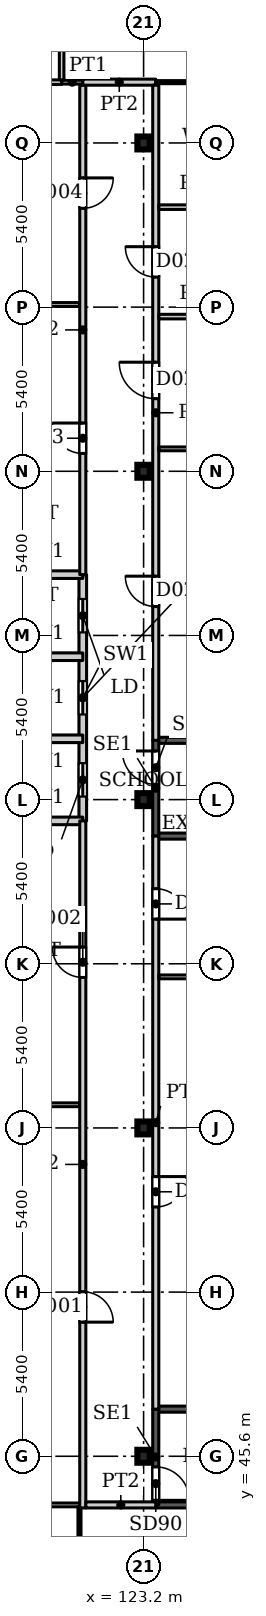
"""IFC4 building model, lengths in metres.
Left out: names, types, materials, properties, quantities, classifications, styles, units other than length and angle.
Written with IfcOpenShell. Run it as: python <this file> out.ifc"""

import sys

from ifc_helpers import new_model, si_unit, direction, frame, frame_2d, origin, origin_2d, place, context, subcontext, project, spatial, rectangle, i_section, extrude, source, transform, mapped, element, fill, save


model = new_model("IFC4")
c1 = context("Model", 3, precision=1e-05, world=origin(), true_north=direction((0.0, 1.0)))
c2 = subcontext(c1, "Body", "Model", "MODEL_VIEW")
j1 = project(units=[si_unit("LENGTHUNIT", "METRE"), si_unit("PLANEANGLEUNIT", "RADIAN")], contexts=[c1])
p1 = place(None, origin())
s1 = spatial("IfcSite", under=j1, at=p1, CompositionType="ELEMENT")
p2 = place(p1, origin())
s2 = spatial("IfcBuilding", under=s1, at=p2, CompositionType="ELEMENT")
p3 = place(p2, frame((0.0, 0.0, 12.5)))
s3 = spatial("IfcBuildingStorey", under=s2, at=p3, CompositionType="ELEMENT", Elevation=12.5)
for number, where, z_axis, x_axis in (
    (1, (123.2, 45.6, 0.0), (0.0, 0.0, 1.0), (1.0, 0.0, 0.0)),
    (2, (123.2, 56.4, 0.0), (0.0, 0.0, 1.0), (1.0, 0.0, 0.0)),
    (3, (123.2, 67.2, 0.0), (0.0, 0.0, 1.0), (1.0, 0.0, 0.0)),
    (4, (123.2, 78.0, 0.0), (0.0, 0.0, 1.0), (1.0, 0.0, 0.0)),
    (5, (123.2, 88.8, 0.0), (0.0, 0.0, 1.0), (1.0, 0.0, 0.0)),
):
    element("IfcColumn", number, at=place(p3, frame(where, z_axis=z_axis, x_axis=x_axis)), inside=s3, PredefinedType="COLUMN", context=c2, shape_type="SweptSolid", body=[
        extrude(i_section(OverallWidth=0.409, OverallDepth=0.425, WebThickness=0.033, FlangeThickness=0.052, FilletRadius=0.013, at=origin_2d()), origin(), (0.0, 0.0, 1.0), 4.5),
    ])
p4 = place(p3, frame((121.2, 66.5, 0.0), z_axis=(0.0, 0.0, 1.0), x_axis=(0.0, 1.0, 0.0)))
e6 = element("IfcWall", 6, at=p4, inside=s3, PredefinedType="PARTITIONING", context=c2, shape_type="SweptSolid", body=[
    extrude(rectangle(XDim=8.1, YDim=0.25, at=frame_2d((4.05, 0.0))), origin(), (0.0, 0.0, 1.0), 4.5),
])
p5 = place(p4, frame((0.8, 0.0, 0.0)))
e7 = element("IfcOpeningElement", 7, at=p5, cuts=e6, PredefinedType="OPENING", context=c2, shape_type="SweptSolid", body=[
    extrude(rectangle(XDim=1.1, YDim=2.2, at=frame_2d((0.55, 1.1))), frame((0.0, 0.135, 0.0), z_axis=(0.0, -1.0, 0.0), x_axis=(1.0, 0.0, 0.0)), (0.0, 0.0, 1.0), 0.27),
])
p6 = place(p4, frame((3.5, 0.0, 0.0)))
e8 = element("IfcOpeningElement", 8, at=p6, cuts=e6, PredefinedType="OPENING", context=c2, shape_type="SweptSolid", body=[
    extrude(rectangle(XDim=1.1, YDim=2.2, at=frame_2d((0.55, 1.1))), frame((0.0, 0.135, 0.0), z_axis=(0.0, -1.0, 0.0), x_axis=(1.0, 0.0, 0.0)), (0.0, 0.0, 1.0), 0.27),
])
p7 = place(p4, frame((6.2, 0.0, 0.0)))
e9 = element("IfcOpeningElement", 9, at=p7, cuts=e6, PredefinedType="OPENING", context=c2, shape_type="SweptSolid", body=[
    extrude(rectangle(XDim=1.1, YDim=2.2, at=frame_2d((0.55, 1.1))), frame((0.0, 0.135, 0.0), z_axis=(0.0, -1.0, 0.0), x_axis=(1.0, 0.0, 0.0)), (0.0, 0.0, 1.0), 0.27),
])
for number, where, z_axis, x_axis in (
    (10, (118.5, 66.5, 0.0), (0.0, 0.0, 1.0), (1.0, 0.0, 0.0)),
    (11, (118.5, 69.2, 0.0), (0.0, 0.0, 1.0), (1.0, 0.0, 0.0)),
    (12, (118.5, 71.9, 0.0), (0.0, 0.0, 1.0), (1.0, 0.0, 0.0)),
    (13, (118.5, 74.6, 0.0), (0.0, 0.0, 1.0), (1.0, 0.0, 0.0)),
):
    element("IfcWall", number, at=place(p3, frame(where, z_axis=z_axis, x_axis=x_axis)), inside=s3, PredefinedType="PARTITIONING", context=c2, shape_type="SweptSolid", body=[
        extrude(rectangle(XDim=2.7, YDim=0.25, at=frame_2d((1.35, 0.0))), origin(), (0.0, 0.0, 1.0), 4.5),
    ])
p8 = place(p3, frame((123.6, 44.0, 0.0), z_axis=(0.0, 0.0, 1.0), x_axis=(1.0, 0.0, 0.0)))
e14 = element("IfcWall", 14, at=p8, inside=s3, PredefinedType="SHEAR", context=c2, shape_type="SweptSolid", body=[
    extrude(rectangle(XDim=7.2, YDim=0.2, at=frame_2d((3.6, 0.0))), origin(), (0.0, 0.0, 1.0), 4.5),
])
p9 = place(p3, frame((123.6, 47.15, 0.0), z_axis=(0.0, 0.0, 1.0), x_axis=(1.0, 0.0, 0.0)))
e15 = element("IfcWall", 15, at=p9, inside=s3, PredefinedType="SHEAR", context=c2, shape_type="SweptSolid", body=[
    extrude(rectangle(XDim=8.4, YDim=0.2, at=frame_2d((4.2, 0.0))), origin(), (0.0, 0.0, 1.0), 4.5),
])
p10 = place(p3, frame((123.6, 44.0, 0.0), z_axis=(0.0, 0.0, 1.0), x_axis=(0.0, 1.0, 0.0)))
e16 = element("IfcWall", 16, at=p10, inside=s3, PredefinedType="SHEAR", context=c2, shape_type="SweptSolid", body=[
    extrude(rectangle(XDim=3.15, YDim=0.2, at=frame_2d((1.575, 0.0))), origin(), (0.0, 0.0, 1.0), 4.5),
])
p11 = place(p10, frame((0.15, 0.0, 0.0)))
e17 = element("IfcOpeningElement", 17, at=p11, cuts=e16, PredefinedType="OPENING", context=c2, shape_type="SweptSolid", body=[
    extrude(rectangle(XDim=1.1, YDim=2.2, at=frame_2d((0.55, 1.1))), frame((0.0, 0.11, 0.0), z_axis=(0.0, -1.0, 0.0), x_axis=(1.0, 0.0, 0.0)), (0.0, 0.0, 1.0), 0.22),
])
p12 = place(p3, frame((123.6, 66.0, 0.0), z_axis=(0.0, 0.0, 1.0), x_axis=(1.0, 0.0, 0.0)))
e18 = element("IfcWall", 18, at=p12, inside=s3, PredefinedType="SHEAR", context=c2, shape_type="SweptSolid", body=[
    extrude(rectangle(XDim=7.2, YDim=0.2, at=frame_2d((3.6, 0.0))), origin(), (0.0, 0.0, 1.0), 4.5),
])
p13 = place(p3, frame((123.6, 69.15, 0.0), z_axis=(0.0, 0.0, 1.0), x_axis=(1.0, 0.0, 0.0)))
e19 = element("IfcWall", 19, at=p13, inside=s3, PredefinedType="SHEAR", context=c2, shape_type="SweptSolid", body=[
    extrude(rectangle(XDim=8.4, YDim=0.2, at=frame_2d((4.2, 0.0))), origin(), (0.0, 0.0, 1.0), 4.5),
])
p14 = place(p3, frame((123.6, 66.0, 0.0), z_axis=(0.0, 0.0, 1.0), x_axis=(0.0, 1.0, 0.0)))
e20 = element("IfcWall", 20, at=p14, inside=s3, PredefinedType="SHEAR", context=c2, shape_type="SweptSolid", body=[
    extrude(rectangle(XDim=3.15, YDim=0.2, at=frame_2d((1.575, 0.0))), origin(), (0.0, 0.0, 1.0), 4.5),
])
p15 = place(p14, frame((1.7, 0.0, 0.0)))
e21 = element("IfcOpeningElement", 21, at=p15, cuts=e20, PredefinedType="OPENING", context=c2, shape_type="SweptSolid", body=[
    extrude(rectangle(XDim=1.1, YDim=2.2, at=frame_2d((0.55, 1.1))), frame((0.0, 0.11, 0.0), z_axis=(0.0, -1.0, 0.0), x_axis=(1.0, 0.0, 0.0)), (0.0, 0.0, 1.0), 0.22),
])
p16 = place(p3, frame((110.183, 90.8, 0.0), z_axis=(0.0, 0.0, 1.0), x_axis=(1.0, 0.0, 0.0)))
e22 = element("IfcWall", 22, at=p16, inside=s3, PredefinedType="PARTITIONING", context=c2, shape_type="SweptSolid", body=[
    extrude(rectangle(XDim=10.321, YDim=0.15, at=frame_2d((5.16, 0.0))), origin(), (0.0, 0.0, 1.0), 4.18),
])
p17 = place(p3, frame((112.862, 44.0, 0.0), z_axis=(0.0, 0.0, 1.0), x_axis=(1.0, 0.0, 0.0)))
e23 = element("IfcWall", 23, at=p17, inside=s3, PredefinedType="PARTITIONING", context=c2, shape_type="SweptSolid", body=[
    extrude(rectangle(XDim=8.279, YDim=0.125, at=frame_2d((4.14, 0.0))), origin(), (0.0, 0.0, 1.0), 4.18),
])
for number, where, z_axis, x_axis in (
    (24, (112.862, 57.162, 0.0), (0.0, 0.0, 1.0), (1.0, 0.0, 0.0)),
    (25, (112.862, 83.487, 0.0), (0.0, 0.0, 1.0), (1.0, 0.0, 0.0)),
):
    element("IfcWall", number, at=place(p3, frame(where, z_axis=z_axis, x_axis=x_axis)), inside=s3, PredefinedType="PARTITIONING", context=c2, shape_type="SweptSolid", body=[
        extrude(rectangle(XDim=8.238, YDim=0.125, at=frame_2d((4.119, 0.0))), origin(), (0.0, 0.0, 1.0), 4.18),
    ])
p18 = place(p3, frame((120.504, 90.8, 0.0), z_axis=(0.0, 0.0, 1.0), x_axis=(1.0, 0.0, 0.0)))
e26 = element("IfcWall", 26, at=p18, inside=s3, PredefinedType="PARTITIONING", context=c2, shape_type="SweptSolid", body=[
    extrude(rectangle(XDim=0.696, YDim=0.125, at=frame_2d((0.348, 0.0))), origin(), (0.0, 0.0, 1.0), 4.18),
])
p19 = place(p3, frame((120.504, 90.875, 0.0), z_axis=(0.0, 0.0, 1.0), x_axis=(0.0, 1.0, 0.0)))
e27 = element("IfcWall", 27, at=p19, inside=s3, PredefinedType="PARTITIONING", context=c2, shape_type="SweptSolid", body=[
    extrude(rectangle(XDim=8.225, YDim=0.15, at=frame_2d((4.113, 0.0))), origin(), (0.0, 0.0, 1.0), 4.18),
])
p20 = place(p3, frame((121.091, 35.3, 0.0), z_axis=(0.0, 0.0, 1.0), x_axis=(0.0, 1.0, 0.0)))
e28 = element("IfcWall", 28, at=p20, inside=s3, PredefinedType="PARTITIONING", context=c2, shape_type="SweptSolid", body=[
    extrude(rectangle(XDim=8.638, YDim=0.1, at=frame_2d((4.319, 0.0))), origin(), (0.0, 0.0, 1.0), 4.18),
])
p21 = place(p3, frame((121.2, 43.9, 0.0), z_axis=(0.0, 0.0, 1.0), x_axis=(0.0, 1.0, 0.0)))
e29 = element("IfcWall", 29, at=p21, inside=s3, PredefinedType="PARTITIONING", context=c2, shape_type="SweptSolid", body=[
    extrude(rectangle(XDim=22.6, YDim=0.2, at=frame_2d((11.3, 0.0))), origin(), (0.0, 0.0, 1.0), 4.18),
])
p22 = place(p21, frame((6.112, 0.0, 0.0)))
e30 = element("IfcOpeningElement", 30, at=p22, cuts=e29, PredefinedType="OPENING", context=c2, shape_type="SweptSolid", body=[
    extrude(rectangle(XDim=1.0, YDim=2.1, at=frame_2d((0.5, 1.05))), frame((0.0, 0.11, 0.0), z_axis=(0.0, -1.0, 0.0), x_axis=(1.0, 0.0, 0.0)), (0.0, 0.0, 1.0), 0.22),
])
p23 = place(p21, frame((17.45, 0.0, 0.0)))
e31 = element("IfcOpeningElement", 31, at=p23, cuts=e29, PredefinedType="OPENING", context=c2, shape_type="SweptSolid", body=[
    extrude(rectangle(XDim=1.0, YDim=2.1, at=frame_2d((0.5, 1.05))), frame((0.0, 0.11, 0.0), z_axis=(0.0, -1.0, 0.0), x_axis=(1.0, 0.0, 0.0)), (0.0, 0.0, 1.0), 0.22),
])
p24 = place(p3, frame((121.2, 74.6, 0.0), z_axis=(0.0, 0.0, 1.0), x_axis=(0.0, 1.0, 0.0)))
e32 = element("IfcWall", 32, at=p24, inside=s3, PredefinedType="PARTITIONING", context=c2, shape_type="SweptSolid", body=[
    extrude(rectangle(XDim=16.1, YDim=0.2, at=frame_2d((8.05, 0.0))), origin(), (0.0, 0.0, 1.0), 4.18),
])
p25 = place(p24, frame((3.987, 0.0, 0.0)))
e33 = element("IfcOpeningElement", 33, at=p25, cuts=e32, PredefinedType="OPENING", context=c2, shape_type="SweptSolid", body=[
    extrude(rectangle(XDim=1.0, YDim=2.1, at=frame_2d((0.5, 1.05))), frame((0.0, 0.11, 0.0), z_axis=(0.0, -1.0, 0.0), x_axis=(1.0, 0.0, 0.0)), (0.0, 0.0, 1.0), 0.22),
])
p26 = place(p24, frame((12.05, 0.0, 0.0)))
e34 = element("IfcOpeningElement", 34, at=p26, cuts=e32, PredefinedType="OPENING", context=c2, shape_type="SweptSolid", body=[
    extrude(rectangle(XDim=1.0, YDim=2.1, at=frame_2d((0.5, 1.05))), frame((0.0, 0.11, 0.0), z_axis=(0.0, -1.0, 0.0), x_axis=(1.0, 0.0, 0.0)), (0.0, 0.0, 1.0), 0.22),
])
p27 = place(p3, frame((121.2, 90.8, 0.0), z_axis=(0.0, 0.0, 1.0), x_axis=(1.0, 0.0, 0.0)))
e35 = element("IfcWall", 35, at=p27, inside=s3, PredefinedType="PARTITIONING", context=c2, shape_type="SweptSolid", body=[
    extrude(rectangle(XDim=2.4, YDim=0.2, at=frame_2d((1.2, 0.0))), origin(), (0.0, 0.0, 1.0), 4.18),
])
p28 = place(p3, frame((121.3, 44.0, 0.0), z_axis=(0.0, 0.0, 1.0), x_axis=(1.0, 0.0, 0.0)))
e36 = element("IfcWall", 36, at=p28, inside=s3, PredefinedType="PARTITIONING", context=c2, shape_type="SweptSolid", body=[
    extrude(rectangle(XDim=2.3, YDim=0.2, at=frame_2d((1.15, 0.0))), origin(), (0.0, 0.0, 1.0), 4.18),
])
p29 = place(p3, frame((123.6, 47.15, 0.0), z_axis=(0.0, 0.0, 1.0), x_axis=(0.0, 1.0, 0.0)))
e37 = element("IfcWall", 37, at=p29, inside=s3, PredefinedType="PARTITIONING", context=c2, shape_type="SweptSolid", body=[
    extrude(rectangle(XDim=18.85, YDim=0.2, at=frame_2d((9.425, 0.0))), origin(), (0.0, 0.0, 1.0), 4.18),
])
p30 = place(p29, frame((6.65, 0.0, 0.0)))
e38 = element("IfcOpeningElement", 38, at=p30, cuts=e37, PredefinedType="OPENING", context=c2, shape_type="SweptSolid", body=[
    extrude(rectangle(XDim=1.0, YDim=2.1, at=frame_2d((0.5, 1.05))), frame((0.0, 0.11, 0.0), z_axis=(0.0, -1.0, 0.0), x_axis=(1.0, 0.0, 0.0)), (0.0, 0.0, 1.0), 0.22),
])
p31 = place(p29, frame((16.119, 0.0, 0.0)))
e39 = element("IfcOpeningElement", 39, at=p31, cuts=e37, PredefinedType="OPENING", context=c2, shape_type="SweptSolid", body=[
    extrude(rectangle(XDim=1.0, YDim=2.1, at=frame_2d((0.5, 1.05))), frame((0.0, 0.11, 0.0), z_axis=(0.0, -1.0, 0.0), x_axis=(1.0, 0.0, 0.0)), (0.0, 0.0, 1.0), 0.22),
])
p32 = place(p3, frame((123.6, 69.15, 0.0), z_axis=(0.0, 0.0, 1.0), x_axis=(0.0, 1.0, 0.0)))
e40 = element("IfcWall", 40, at=p32, inside=s3, PredefinedType="PARTITIONING", context=c2, shape_type="SweptSolid", body=[
    extrude(rectangle(XDim=21.55, YDim=0.2, at=frame_2d((10.775, 0.0))), origin(), (0.0, 0.0, 1.0), 4.18),
])
p33 = place(p32, frame((4.4, 0.0, 0.0)))
e41 = element("IfcOpeningElement", 41, at=p33, cuts=e40, PredefinedType="OPENING", context=c2, shape_type="SweptSolid", body=[
    extrude(rectangle(XDim=1.0, YDim=2.1, at=frame_2d((0.5, 1.05))), frame((0.0, 0.11, 0.0), z_axis=(0.0, -1.0, 0.0), x_axis=(1.0, 0.0, 0.0)), (0.0, 0.0, 1.0), 0.22),
])
p34 = place(p32, frame((15.238, 0.0, 0.0)))
e42 = element("IfcOpeningElement", 42, at=p34, cuts=e40, PredefinedType="OPENING", context=c2, shape_type="SweptSolid", body=[
    extrude(rectangle(XDim=1.0, YDim=2.1, at=frame_2d((0.5, 1.05))), frame((0.0, 0.11, 0.0), z_axis=(0.0, -1.0, 0.0), x_axis=(1.0, 0.0, 0.0)), (0.0, 0.0, 1.0), 0.22),
])
p35 = place(p32, frame((11.238, 0.0, 0.0)))
e43 = element("IfcOpeningElement", 43, at=p35, cuts=e40, PredefinedType="OPENING", context=c2, shape_type="SweptSolid", body=[
    extrude(rectangle(XDim=1.2, YDim=2.1, at=frame_2d((0.6, 1.05))), frame((0.0, 0.11, 0.0), z_axis=(0.0, -1.0, 0.0), x_axis=(1.0, 0.0, 0.0)), (0.0, 0.0, 1.0), 0.22),
])
p36 = place(p3, frame((123.6, 90.8, 0.0), z_axis=(0.0, 0.0, 1.0), x_axis=(1.0, 0.0, 0.0)))
e44 = element("IfcWall", 44, at=p36, inside=s3, PredefinedType="PARTITIONING", context=c2, shape_type="SweptSolid", body=[
    extrude(rectangle(XDim=8.4, YDim=0.1, at=frame_2d((4.2, 0.0))), origin(), (0.0, 0.0, 1.0), 4.18),
])
for number, where, z_axis, x_axis in (
    (45, (123.7, 61.369, 0.0), (0.0, 0.0, 1.0), (1.0, 0.0, 0.0)),
    (46, (123.7, 78.738, 0.0), (0.0, 0.0, 1.0), (1.0, 0.0, 0.0)),
):
    element("IfcWall", number, at=place(p3, frame(where, z_axis=z_axis, x_axis=x_axis)), inside=s3, PredefinedType="PARTITIONING", context=c2, shape_type="SweptSolid", body=[
        extrude(rectangle(XDim=8.3, YDim=0.125, at=frame_2d((4.15, 0.0))), origin(), (0.0, 0.0, 1.0), 4.18),
    ])
for number, where, z_axis, x_axis in (
    (47, (123.7, 83.088, 0.0), (0.0, 0.0, 1.0), (1.0, 0.0, 0.0)),
    (48, (123.7, 86.688, 0.0), (0.0, 0.0, 1.0), (1.0, 0.0, 0.0)),
):
    element("IfcWall", number, at=place(p3, frame(where, z_axis=z_axis, x_axis=x_axis)), inside=s3, PredefinedType="PARTITIONING", context=c2, shape_type="SweptSolid", body=[
        extrude(rectangle(XDim=3.025, YDim=0.15, at=frame_2d((1.513, 0.0))), origin(), (0.0, 0.0, 1.0), 4.18),
    ])
m1 = source(origin(), c2, "Body", "SweptSolid", [
    extrude(rectangle(XDim=1.1, YDim=2.2, at=frame_2d((0.55, 1.1))), frame((0.0, 0.025, 0.0), z_axis=(0.0, -1.0, 0.0), x_axis=(1.0, 0.0, 0.0)), (0.0, 0.0, 1.0), 0.05),
])
p37 = place(p5, origin())
e49 = element("IfcDoor", 49, at=p37, inside=s3, OperationType="SLIDING_TO_LEFT", PredefinedType="DOOR", context=c2, shape_type="MappedRepresentation", body=[
    mapped(m1, transform((0.0, 0.0, 0.0), x_axis=(1.0, 0.0, 0.0), y_axis=(0.0, 1.0, 0.0), z_axis=(0.0, 0.0, 1.0), scale=1.0)),
])
fill(e7, e49)
p38 = place(p6, origin())
e50 = element("IfcDoor", 50, at=p38, inside=s3, OperationType="SLIDING_TO_LEFT", PredefinedType="DOOR", context=c2, shape_type="MappedRepresentation", body=[
    mapped(m1, transform((0.0, 0.0, 0.0), x_axis=(1.0, 0.0, 0.0), y_axis=(0.0, 1.0, 0.0), z_axis=(0.0, 0.0, 1.0), scale=1.0)),
])
fill(e8, e50)
p39 = place(p7, origin())
e51 = element("IfcDoor", 51, at=p39, inside=s3, OperationType="SLIDING_TO_LEFT", PredefinedType="DOOR", context=c2, shape_type="MappedRepresentation", body=[
    mapped(m1, transform((0.0, 0.0, 0.0), x_axis=(1.0, 0.0, 0.0), y_axis=(0.0, 1.0, 0.0), z_axis=(0.0, 0.0, 1.0), scale=1.0)),
])
fill(e9, e51)
m2 = source(origin(), c2, "Body", "SweptSolid", [
    extrude(rectangle(XDim=1.1, YDim=2.2, at=frame_2d((0.55, 1.1))), frame((0.0, 0.025, 0.0), z_axis=(0.0, -1.0, 0.0), x_axis=(1.0, 0.0, 0.0)), (0.0, 0.0, 1.0), 0.05),
])
p40 = place(p11, origin())
e52 = element("IfcDoor", 52, at=p40, inside=s3, OperationType="SINGLE_SWING_RIGHT", PredefinedType="DOOR", context=c2, shape_type="MappedRepresentation", body=[
    mapped(m2, transform((0.0, 0.0, 0.0), x_axis=(1.0, 0.0, 0.0), y_axis=(0.0, 1.0, 0.0), z_axis=(0.0, 0.0, 1.0), scale=1.0)),
])
fill(e17, e52)
p41 = place(p15, origin())
e53 = element("IfcDoor", 53, at=p41, inside=s3, OperationType="SINGLE_SWING_LEFT", PredefinedType="DOOR", context=c2, shape_type="MappedRepresentation", body=[
    mapped(m2, transform((0.0, 0.0, 0.0), x_axis=(1.0, 0.0, 0.0), y_axis=(0.0, 1.0, 0.0), z_axis=(0.0, 0.0, 1.0), scale=1.0)),
])
fill(e21, e53)
m3 = source(origin(), c2, "Body", "SweptSolid", [
    extrude(rectangle(XDim=1.0, YDim=2.1, at=frame_2d((0.5, 1.05))), frame((0.0, 0.025, 0.0), z_axis=(0.0, -1.0, 0.0), x_axis=(1.0, 0.0, 0.0)), (0.0, 0.0, 1.0), 0.05),
])
p42 = place(p22, origin())
e54 = element("IfcDoor", 54, at=p42, inside=s3, OperationType="SINGLE_SWING_RIGHT", PredefinedType="DOOR", context=c2, shape_type="MappedRepresentation", body=[
    mapped(m3, transform((0.0, 0.0, 0.0), x_axis=(1.0, 0.0, 0.0), y_axis=(0.0, 1.0, 0.0), z_axis=(0.0, 0.0, 1.0), scale=1.0)),
])
fill(e30, e54)
p43 = place(p23, origin())
e55 = element("IfcDoor", 55, at=p43, inside=s3, OperationType="SINGLE_SWING_LEFT", PredefinedType="DOOR", context=c2, shape_type="MappedRepresentation", body=[
    mapped(m3, transform((0.0, 0.0, 0.0), x_axis=(1.0, 0.0, 0.0), y_axis=(0.0, 1.0, 0.0), z_axis=(0.0, 0.0, 1.0), scale=1.0)),
])
fill(e31, e55)
p44 = place(p25, origin())
e56 = element("IfcDoor", 56, at=p44, inside=s3, OperationType="SINGLE_SWING_LEFT", PredefinedType="DOOR", context=c2, shape_type="MappedRepresentation", body=[
    mapped(m3, transform((0.0, 0.0, 0.0), x_axis=(1.0, 0.0, 0.0), y_axis=(0.0, 1.0, 0.0), z_axis=(0.0, 0.0, 1.0), scale=1.0)),
])
fill(e33, e56)
p45 = place(p26, origin())
e57 = element("IfcDoor", 57, at=p45, inside=s3, OperationType="SINGLE_SWING_RIGHT", PredefinedType="DOOR", context=c2, shape_type="MappedRepresentation", body=[
    mapped(m3, transform((0.0, 0.0, 0.0), x_axis=(1.0, 0.0, 0.0), y_axis=(0.0, 1.0, 0.0), z_axis=(0.0, 0.0, 1.0), scale=1.0)),
])
fill(e34, e57)
p46 = place(p30, origin())
e58 = element("IfcDoor", 58, at=p46, inside=s3, OperationType="SINGLE_SWING_RIGHT", PredefinedType="DOOR", context=c2, shape_type="MappedRepresentation", body=[
    mapped(m3, transform((0.0, 0.0, 0.0), x_axis=(1.0, 0.0, 0.0), y_axis=(0.0, 1.0, 0.0), z_axis=(0.0, 0.0, 1.0), scale=1.0)),
])
fill(e38, e58)
p47 = place(p31, origin())
e59 = element("IfcDoor", 59, at=p47, inside=s3, OperationType="SINGLE_SWING_RIGHT", PredefinedType="DOOR", context=c2, shape_type="MappedRepresentation", body=[
    mapped(m3, transform((0.0, 0.0, 0.0), x_axis=(1.0, 0.0, 0.0), y_axis=(0.0, 1.0, 0.0), z_axis=(0.0, 0.0, 1.0), scale=1.0)),
])
fill(e39, e59)
p48 = place(p33, origin())
e60 = element("IfcDoor", 60, at=p48, inside=s3, OperationType="SINGLE_SWING_LEFT", PredefinedType="DOOR", context=c2, shape_type="MappedRepresentation", body=[
    mapped(m3, transform((0.0, 0.0, 0.0), x_axis=(1.0, 0.0, 0.0), y_axis=(0.0, 1.0, 0.0), z_axis=(0.0, 0.0, 1.0), scale=1.0)),
])
fill(e41, e60)
p49 = place(p34, origin())
e61 = element("IfcDoor", 61, at=p49, inside=s3, OperationType="SINGLE_SWING_LEFT", PredefinedType="DOOR", context=c2, shape_type="MappedRepresentation", body=[
    mapped(m3, transform((0.0, 0.0, 0.0), x_axis=(1.0, 0.0, 0.0), y_axis=(0.0, 1.0, 0.0), z_axis=(0.0, 0.0, 1.0), scale=1.0)),
])
fill(e42, e61)
m4 = source(origin(), c2, "Body", "SweptSolid", [
    extrude(rectangle(XDim=1.2, YDim=2.1, at=frame_2d((0.6, 1.05))), frame((0.0, 0.025, 0.0), z_axis=(0.0, -1.0, 0.0), x_axis=(1.0, 0.0, 0.0)), (0.0, 0.0, 1.0), 0.05),
])
p50 = place(p35, origin())
e62 = element("IfcDoor", 62, at=p50, inside=s3, OperationType="SINGLE_SWING_LEFT", PredefinedType="DOOR", context=c2, shape_type="MappedRepresentation", body=[
    mapped(m4, transform((0.0, 0.0, 0.0), x_axis=(1.0, 0.0, 0.0), y_axis=(0.0, 1.0, 0.0), z_axis=(0.0, 0.0, 1.0), scale=1.0)),
])
fill(e43, e62)
save(model, sys.argv[1])
